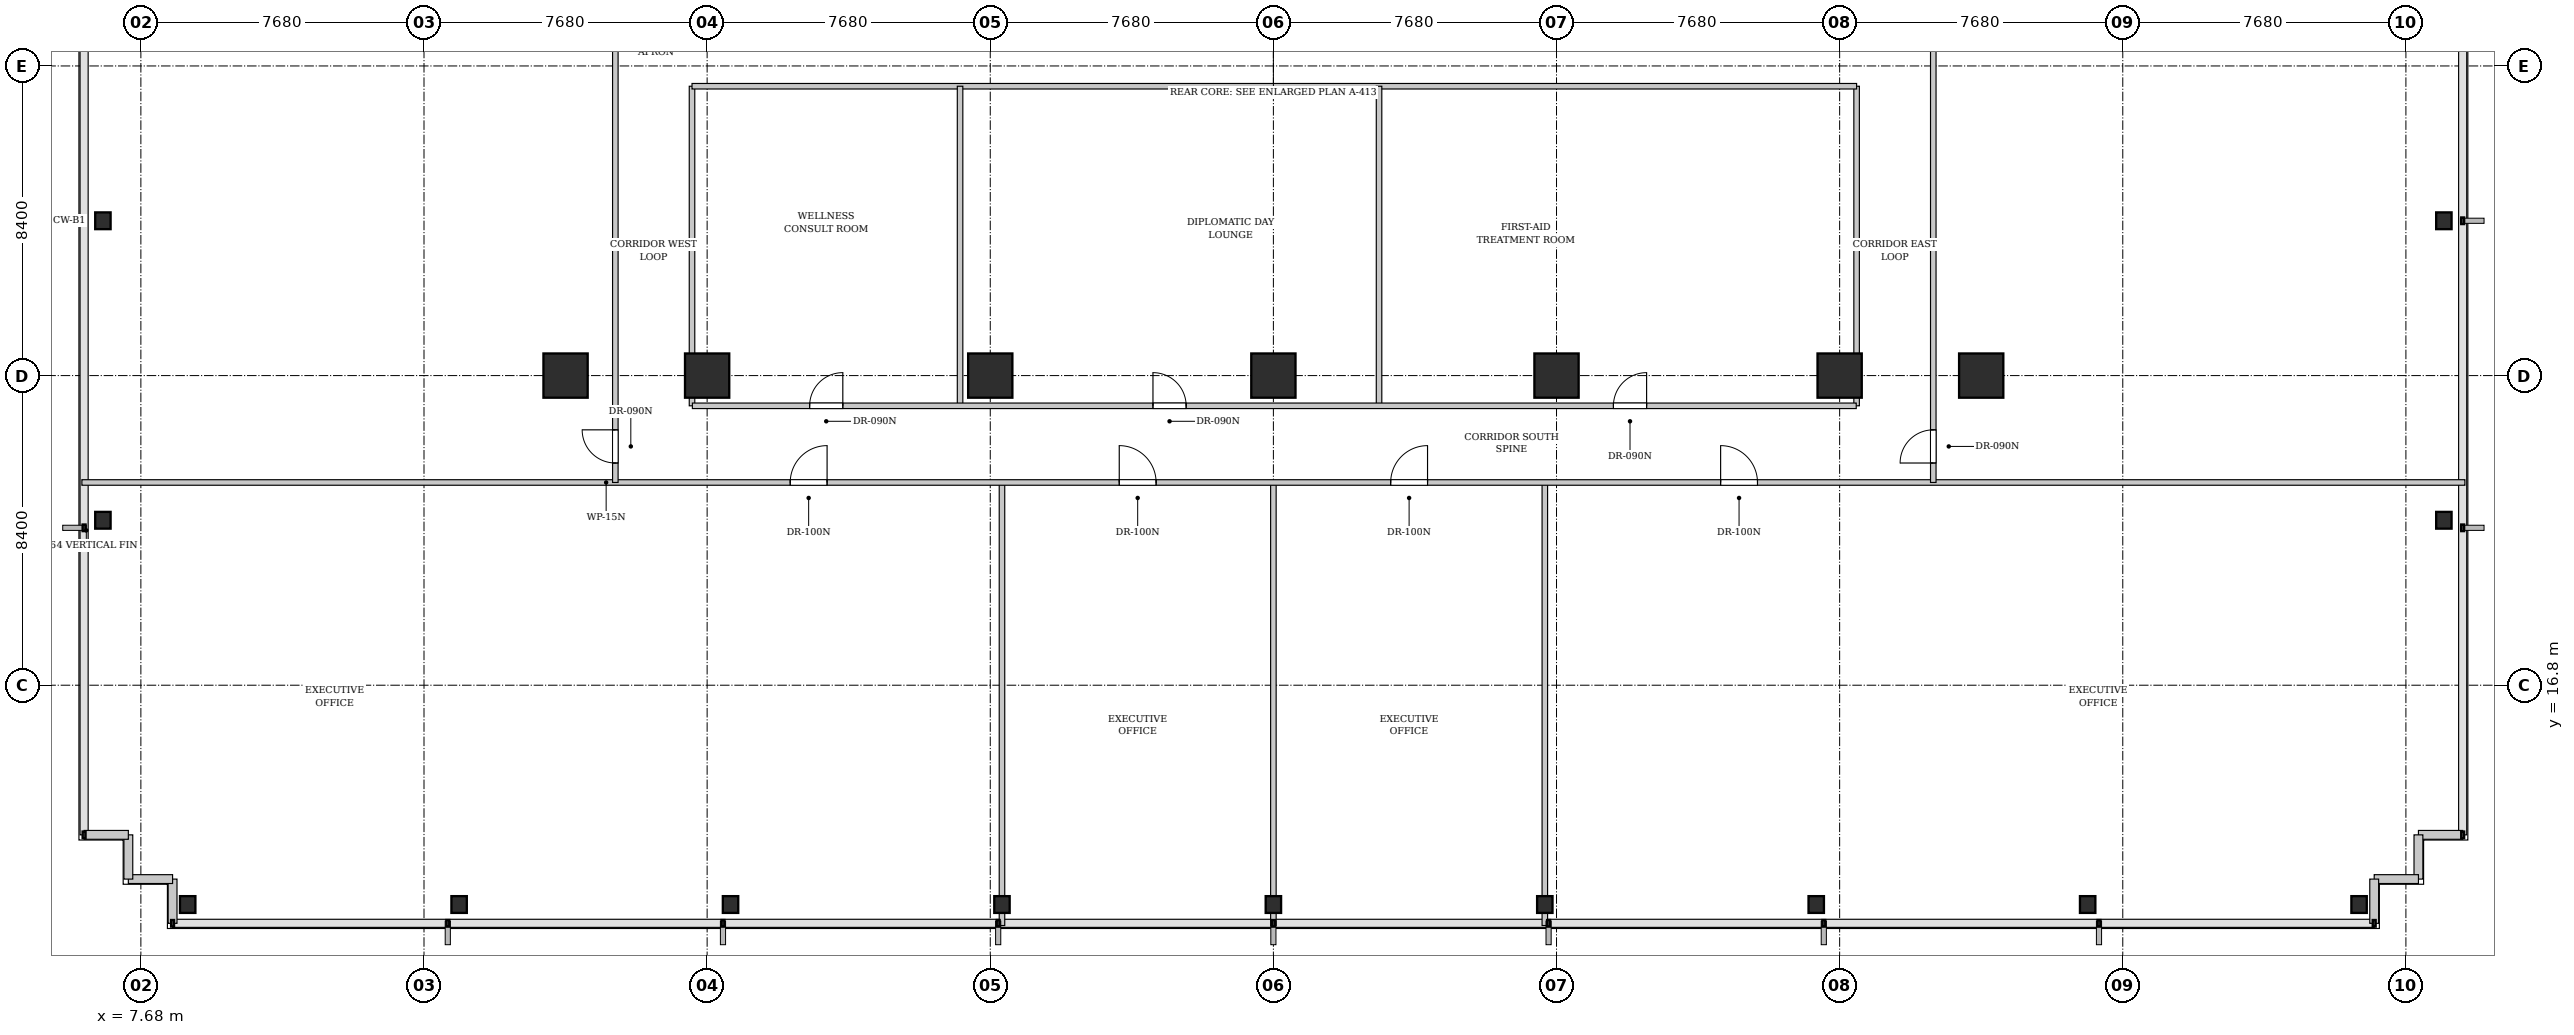
"""IFC4 building model, lengths in metres.
Left out: names, types, materials, properties, quantities, classifications, styles, units other than length and angle.
Written with IfcOpenShell. Run it as: python <this file> out.ifc"""

import sys

from ifc_helpers import new_model, si_unit, direction, frame, frame_2d, origin, origin_2d, place, context, subcontext, project, spatial, rectangle, i_section, extrude, element, fill, save


model = new_model("IFC4")
c1 = context("Model", 3, precision=1e-05, world=origin(), true_north=direction((0.0, 1.0)))
c2 = subcontext(c1, "Body", "Model", "MODEL_VIEW")
j1 = project(units=[si_unit("LENGTHUNIT", "METRE"), si_unit("PLANEANGLEUNIT", "RADIAN")], contexts=[c1])
p1 = place(None, origin())
s1 = spatial("IfcSite", under=j1, at=p1, CompositionType="ELEMENT")
p2 = place(p1, origin())
s2 = spatial("IfcBuilding", under=s1, at=p2, CompositionType="ELEMENT")
p3 = place(p2, frame((0.0, 0.0, 47.4)))
s3 = spatial("IfcBuildingStorey", under=s2, at=p3, CompositionType="ELEMENT", Elevation=47.4)
for number, where, z_axis, x_axis in (
    (1, (23.04, 25.2, 0.0), (0.0, 0.0, 1.0), (1.0, 0.0, 0.0)),
    (2, (30.72, 25.2, 0.0), (0.0, 0.0, 1.0), (1.0, 0.0, 0.0)),
    (3, (38.4, 25.2, 0.0), (0.0, 0.0, 1.0), (1.0, 0.0, 0.0)),
    (4, (46.08, 25.2, 0.0), (0.0, 0.0, 1.0), (1.0, 0.0, 0.0)),
    (5, (53.76, 25.2, 0.0), (0.0, 0.0, 1.0), (1.0, 0.0, 0.0)),
    (6, (19.2, 25.2, 0.0), (0.0, 0.0, 1.0), (1.0, 0.0, 0.0)),
    (7, (57.6, 25.2, 0.0), (0.0, 0.0, 1.0), (1.0, 0.0, 0.0)),
):
    element("IfcColumn", number, at=place(p3, frame(where, z_axis=z_axis, x_axis=x_axis)), inside=s3, PredefinedType="COLUMN", context=c2, shape_type="SweptSolid", body=[
        extrude(rectangle(XDim=1.2, YDim=1.2, at=origin_2d()), origin(), (0.0, 0.0, 1.0), 3.4),
    ])
for number, where, z_axis, x_axis in (
    (8, (8.95, 10.85, 0.0), (0.0, 0.0, 1.0), (1.0, 0.0, 0.0)),
    (9, (16.312, 10.85, 0.0), (0.0, 0.0, 1.0), (1.0, 0.0, 0.0)),
    (10, (23.675, 10.85, 0.0), (0.0, 0.0, 1.0), (1.0, 0.0, 0.0)),
    (11, (31.038, 10.85, 0.0), (0.0, 0.0, 1.0), (1.0, 0.0, 0.0)),
    (12, (38.4, 10.85, 0.0), (0.0, 0.0, 1.0), (1.0, 0.0, 0.0)),
    (13, (45.762, 10.85, 0.0), (0.0, 0.0, 1.0), (1.0, 0.0, 0.0)),
    (14, (53.125, 10.85, 0.0), (0.0, 0.0, 1.0), (1.0, 0.0, 0.0)),
    (15, (60.488, 10.85, 0.0), (0.0, 0.0, 1.0), (1.0, 0.0, 0.0)),
    (16, (67.85, 10.85, 0.0), (0.0, 0.0, 1.0), (1.0, 0.0, 0.0)),
    (17, (6.65, 21.275, 0.0), (0.0, 0.0, 1.0), (1.0, 0.0, 0.0)),
    (18, (70.15, 21.275, 0.0), (0.0, 0.0, 1.0), (1.0, 0.0, 0.0)),
    (19, (6.65, 29.4, 0.0), (0.0, 0.0, 1.0), (1.0, 0.0, 0.0)),
    (20, (70.15, 29.4, 0.0), (0.0, 0.0, 1.0), (1.0, 0.0, 0.0)),
):
    element("IfcColumn", number, at=place(p3, frame(where, z_axis=z_axis, x_axis=x_axis)), inside=s3, PredefinedType="COLUMN", context=c2, shape_type="SweptSolid", body=[
        extrude(i_section(OverallWidth=0.418, OverallDepth=0.455, WebThickness=0.042, FlangeThickness=0.068, FilletRadius=0.015, at=origin_2d()), origin(), (0.0, 0.0, 1.0), 3.4),
    ])
for number, where, z_axis, x_axis in (
    (21, (8.54, 10.34, 0.0), (0.0, 0.0, 1.0), (0.0, 1.0, 0.0)),
    (22, (8.54, 11.54, 0.0), (0.0, 0.0, 1.0), (-1.0, 0.0, 0.0)),
    (23, (7.34, 11.54, 0.0), (0.0, 0.0, 1.0), (0.0, 1.0, 0.0)),
):
    element("IfcWall", number, at=place(p3, frame(where, z_axis=z_axis, x_axis=x_axis)), inside=s3, PredefinedType="SOLIDWALL", context=c2, shape_type="SweptSolid", body=[
        extrude(rectangle(XDim=1.2, YDim=0.24, at=frame_2d((0.6, 0.0))), origin(), (0.0, 0.0, 1.0), 3.18),
    ])
p4 = place(p3, frame((7.34, 12.74, 0.0), z_axis=(0.0, 0.0, 1.0), x_axis=(-1.0, 0.0, 0.0)))
e24 = element("IfcWall", 24, at=p4, inside=s3, PredefinedType="SOLIDWALL", context=c2, shape_type="SweptSolid", body=[
    extrude(rectangle(XDim=1.2, YDim=0.24, at=frame_2d((0.6, 0.0))), origin(), (0.0, 0.0, 1.0), 3.18),
])
for number, where, z_axis, x_axis in (
    (25, (70.66, 12.74, 0.0), (0.0, 0.0, 1.0), (-1.0, 0.0, 0.0)),
    (26, (69.46, 12.74, 0.0), (0.0, 0.0, 1.0), (0.0, -1.0, 0.0)),
    (27, (69.46, 11.54, 0.0), (0.0, 0.0, 1.0), (-1.0, 0.0, 0.0)),
    (28, (68.26, 11.54, 0.0), (0.0, 0.0, 1.0), (0.0, -1.0, 0.0)),
):
    element("IfcWall", number, at=place(p3, frame(where, z_axis=z_axis, x_axis=x_axis)), inside=s3, PredefinedType="SOLIDWALL", context=c2, shape_type="SweptSolid", body=[
        extrude(rectangle(XDim=1.2, YDim=0.24, at=frame_2d((0.6, 0.0))), origin(), (0.0, 0.0, 1.0), 3.18),
    ])
for number, where, z_axis, x_axis in (
    (29, (31.038, 10.28, 0.0), (0.0, 0.0, 1.0), (0.0, 1.0, 0.0)),
    (30, (38.4, 10.28, 0.0), (0.0, 0.0, 1.0), (0.0, 1.0, 0.0)),
    (31, (45.763, 10.28, 0.0), (0.0, 0.0, 1.0), (0.0, 1.0, 0.0)),
):
    element("IfcWall", number, at=place(p3, frame(where, z_axis=z_axis, x_axis=x_axis)), inside=s3, PredefinedType="PARTITIONING", context=c2, shape_type="SweptSolid", body=[
        extrude(rectangle(XDim=12.04, YDim=0.15, at=frame_2d((6.02, 0.0))), origin(), (0.0, 0.0, 1.0), 2.475),
    ])
p5 = place(p3, frame((6.08, 22.3, 0.0), z_axis=(0.0, 0.0, 1.0), x_axis=(1.0, 0.0, 0.0)))
e32 = element("IfcWall", 32, at=p5, inside=s3, PredefinedType="PARTITIONING", context=c2, shape_type="SweptSolid", body=[
    extrude(rectangle(XDim=64.64, YDim=0.15, at=frame_2d((32.32, 0.0))), origin(), (0.0, 0.0, 1.0), 3.18),
])
p6 = place(p5, frame((19.214, 0.0, 0.0)))
e33 = element("IfcOpeningElement", 33, at=p6, cuts=e32, PredefinedType="OPENING", context=c2, shape_type="SweptSolid", body=[
    extrude(rectangle(XDim=1.0, YDim=2.15, at=frame_2d((0.5, 1.075))), frame((0.0, 0.085, 0.0), z_axis=(0.0, -1.0, 0.0), x_axis=(1.0, 0.0, 0.0)), (0.0, 0.0, 1.0), 0.17),
])
p7 = place(p5, frame((28.139, 0.0, 0.0)))
e34 = element("IfcOpeningElement", 34, at=p7, cuts=e32, PredefinedType="OPENING", context=c2, shape_type="SweptSolid", body=[
    extrude(rectangle(XDim=1.0, YDim=2.15, at=frame_2d((0.5, 1.075))), frame((0.0, 0.085, 0.0), z_axis=(0.0, -1.0, 0.0), x_axis=(1.0, 0.0, 0.0)), (0.0, 0.0, 1.0), 0.17),
])
p8 = place(p5, frame((35.501, 0.0, 0.0)))
e35 = element("IfcOpeningElement", 35, at=p8, cuts=e32, PredefinedType="OPENING", context=c2, shape_type="SweptSolid", body=[
    extrude(rectangle(XDim=1.0, YDim=2.15, at=frame_2d((0.5, 1.075))), frame((0.0, 0.085, 0.0), z_axis=(0.0, -1.0, 0.0), x_axis=(1.0, 0.0, 0.0)), (0.0, 0.0, 1.0), 0.17),
])
p9 = place(p5, frame((44.451, 0.0, 0.0)))
e36 = element("IfcOpeningElement", 36, at=p9, cuts=e32, PredefinedType="OPENING", context=c2, shape_type="SweptSolid", body=[
    extrude(rectangle(XDim=1.0, YDim=2.15, at=frame_2d((0.5, 1.075))), frame((0.0, 0.085, 0.0), z_axis=(0.0, -1.0, 0.0), x_axis=(1.0, 0.0, 0.0)), (0.0, 0.0, 1.0), 0.17),
])
p10 = place(p3, frame((20.55, 22.3, 0.0), z_axis=(0.0, 0.0, 1.0), x_axis=(0.0, 1.0, 0.0)))
e37 = element("IfcWall", 37, at=p10, inside=s3, PredefinedType="PARTITIONING", context=c2, shape_type="SweptSolid", body=[
    extrude(rectangle(XDim=26.22, YDim=0.15, at=frame_2d((13.11, 0.0))), origin(), (0.0, 0.0, 1.0), 3.18),
])
p11 = place(p10, frame((0.528, 0.0, 0.0)))
e38 = element("IfcOpeningElement", 38, at=p11, cuts=e37, PredefinedType="OPENING", context=c2, shape_type="SweptSolid", body=[
    extrude(rectangle(XDim=0.9, YDim=2.15, at=frame_2d((0.45, 1.075))), frame((0.0, 0.085, 0.0), z_axis=(0.0, -1.0, 0.0), x_axis=(1.0, 0.0, 0.0)), (0.0, 0.0, 1.0), 0.17),
])
p12 = place(p3, frame((56.3, 22.3, 0.0), z_axis=(0.0, 0.0, 1.0), x_axis=(0.0, 1.0, 0.0)))
e39 = element("IfcWall", 39, at=p12, inside=s3, PredefinedType="PARTITIONING", context=c2, shape_type="SweptSolid", body=[
    extrude(rectangle(XDim=26.22, YDim=0.15, at=frame_2d((13.11, 0.0))), origin(), (0.0, 0.0, 1.0), 3.18),
])
p13 = place(p12, frame((0.528, 0.0, 0.0)))
e40 = element("IfcOpeningElement", 40, at=p13, cuts=e39, PredefinedType="OPENING", context=c2, shape_type="SweptSolid", body=[
    extrude(rectangle(XDim=0.9, YDim=2.15, at=frame_2d((0.45, 1.075))), frame((0.0, 0.085, 0.0), z_axis=(0.0, -1.0, 0.0), x_axis=(1.0, 0.0, 0.0)), (0.0, 0.0, 1.0), 0.17),
])
for number, where, z_axis, x_axis in (
    (41, (22.63, 24.38, 0.0), (0.0, 0.0, 1.0), (0.0, 1.0, 0.0)),
    (42, (54.22, 24.38, 0.0), (0.0, 0.0, 1.0), (0.0, 1.0, 0.0)),
):
    element("IfcWall", number, at=place(p3, frame(where, z_axis=z_axis, x_axis=x_axis)), inside=s3, PredefinedType="PARTITIONING", context=c2, shape_type="SweptSolid", body=[
        extrude(rectangle(XDim=8.67, YDim=0.15, at=frame_2d((4.335, 0.0))), origin(), (0.0, 0.0, 1.0), 3.18),
    ])
p14 = place(p3, frame((22.63, 33.05, 0.0), z_axis=(0.0, 0.0, 1.0), x_axis=(1.0, 0.0, 0.0)))
e43 = element("IfcWall", 43, at=p14, inside=s3, PredefinedType="PARTITIONING", context=c2, shape_type="SweptSolid", body=[
    extrude(rectangle(XDim=31.59, YDim=0.15, at=frame_2d((15.795, 0.0))), origin(), (0.0, 0.0, 1.0), 3.18),
])
for number, where, z_axis, x_axis in (
    (44, (29.901, 24.38, 0.0), (0.0, 0.0, 1.0), (0.0, 1.0, 0.0)),
    (45, (41.266, 24.38, 0.0), (0.0, 0.0, 1.0), (0.0, 1.0, 0.0)),
):
    element("IfcWall", number, at=place(p3, frame(where, z_axis=z_axis, x_axis=x_axis)), inside=s3, PredefinedType="PARTITIONING", context=c2, shape_type="SweptSolid", body=[
        extrude(rectangle(XDim=8.67, YDim=0.15, at=frame_2d((4.335, 0.0))), origin(), (0.0, 0.0, 1.0), 3.18),
    ])
p15 = place(p3, frame((22.64, 24.38, 0.0), z_axis=(0.0, 0.0, 1.0), x_axis=(1.0, 0.0, 0.0)))
e46 = element("IfcWall", 46, at=p15, inside=s3, PredefinedType="PARTITIONING", context=c2, shape_type="SweptSolid", body=[
    extrude(rectangle(XDim=31.57, YDim=0.15, at=frame_2d((15.785, 0.0))), origin(), (0.0, 0.0, 1.0), 3.18),
])
p16 = place(p15, frame((3.18, 0.0, 0.0)))
e47 = element("IfcOpeningElement", 47, at=p16, cuts=e46, PredefinedType="OPENING", context=c2, shape_type="SweptSolid", body=[
    extrude(rectangle(XDim=0.9, YDim=2.15, at=frame_2d((0.45, 1.075))), frame((0.0, 0.085, 0.0), z_axis=(0.0, -1.0, 0.0), x_axis=(1.0, 0.0, 0.0)), (0.0, 0.0, 1.0), 0.17),
])
p17 = place(p15, frame((12.493, 0.0, 0.0)))
e48 = element("IfcOpeningElement", 48, at=p17, cuts=e46, PredefinedType="OPENING", context=c2, shape_type="SweptSolid", body=[
    extrude(rectangle(XDim=0.9, YDim=2.15, at=frame_2d((0.45, 1.075))), frame((0.0, 0.085, 0.0), z_axis=(0.0, -1.0, 0.0), x_axis=(1.0, 0.0, 0.0)), (0.0, 0.0, 1.0), 0.17),
])
p18 = place(p15, frame((24.984, 0.0, 0.0)))
e49 = element("IfcOpeningElement", 49, at=p18, cuts=e46, PredefinedType="OPENING", context=c2, shape_type="SweptSolid", body=[
    extrude(rectangle(XDim=0.9, YDim=2.15, at=frame_2d((0.45, 1.075))), frame((0.0, 0.085, 0.0), z_axis=(0.0, -1.0, 0.0), x_axis=(1.0, 0.0, 0.0)), (0.0, 0.0, 1.0), 0.17),
])
p19 = place(p6, origin())
e50 = element("IfcDoor", 50, at=p19, inside=s3, OperationType="SINGLE_SWING_RIGHT", PredefinedType="DOOR", context=c2, shape_type="SweptSolid", body=[
    extrude(rectangle(XDim=1.0, YDim=2.15, at=frame_2d((0.5, 1.075))), frame((0.0, 0.025, 0.0), z_axis=(0.0, -1.0, 0.0), x_axis=(1.0, 0.0, 0.0)), (0.0, 0.0, 1.0), 0.05),
])
fill(e33, e50)
p20 = place(p7, origin())
e51 = element("IfcDoor", 51, at=p20, inside=s3, OperationType="SINGLE_SWING_LEFT", PredefinedType="DOOR", context=c2, shape_type="SweptSolid", body=[
    extrude(rectangle(XDim=1.0, YDim=2.15, at=frame_2d((0.5, 1.075))), frame((0.0, 0.025, 0.0), z_axis=(0.0, -1.0, 0.0), x_axis=(1.0, 0.0, 0.0)), (0.0, 0.0, 1.0), 0.05),
])
fill(e34, e51)
p21 = place(p8, origin())
e52 = element("IfcDoor", 52, at=p21, inside=s3, OperationType="SINGLE_SWING_RIGHT", PredefinedType="DOOR", context=c2, shape_type="SweptSolid", body=[
    extrude(rectangle(XDim=1.0, YDim=2.15, at=frame_2d((0.5, 1.075))), frame((0.0, 0.025, 0.0), z_axis=(0.0, -1.0, 0.0), x_axis=(1.0, 0.0, 0.0)), (0.0, 0.0, 1.0), 0.05),
])
fill(e35, e52)
p22 = place(p9, origin())
e53 = element("IfcDoor", 53, at=p22, inside=s3, OperationType="SINGLE_SWING_LEFT", PredefinedType="DOOR", context=c2, shape_type="SweptSolid", body=[
    extrude(rectangle(XDim=1.0, YDim=2.15, at=frame_2d((0.5, 1.075))), frame((0.0, 0.025, 0.0), z_axis=(0.0, -1.0, 0.0), x_axis=(1.0, 0.0, 0.0)), (0.0, 0.0, 1.0), 0.05),
])
fill(e36, e53)
p23 = place(p11, origin())
e54 = element("IfcDoor", 54, at=p23, inside=s3, OperationType="SINGLE_SWING_RIGHT", PredefinedType="DOOR", context=c2, shape_type="SweptSolid", body=[
    extrude(rectangle(XDim=0.9, YDim=2.15, at=frame_2d((0.45, 1.075))), frame((0.0, 0.025, 0.0), z_axis=(0.0, -1.0, 0.0), x_axis=(1.0, 0.0, 0.0)), (0.0, 0.0, 1.0), 0.05),
])
fill(e38, e54)
p24 = place(p13, origin())
e55 = element("IfcDoor", 55, at=p24, inside=s3, OperationType="SINGLE_SWING_LEFT", PredefinedType="DOOR", context=c2, shape_type="SweptSolid", body=[
    extrude(rectangle(XDim=0.9, YDim=2.15, at=frame_2d((0.45, 1.075))), frame((0.0, 0.025, 0.0), z_axis=(0.0, -1.0, 0.0), x_axis=(1.0, 0.0, 0.0)), (0.0, 0.0, 1.0), 0.05),
])
fill(e40, e55)
p25 = place(p16, origin())
e56 = element("IfcDoor", 56, at=p25, inside=s3, OperationType="SINGLE_SWING_RIGHT", PredefinedType="DOOR", context=c2, shape_type="SweptSolid", body=[
    extrude(rectangle(XDim=0.9, YDim=2.15, at=frame_2d((0.45, 1.075))), frame((0.0, 0.025, 0.0), z_axis=(0.0, -1.0, 0.0), x_axis=(1.0, 0.0, 0.0)), (0.0, 0.0, 1.0), 0.05),
])
fill(e47, e56)
p26 = place(p17, origin())
e57 = element("IfcDoor", 57, at=p26, inside=s3, OperationType="SINGLE_SWING_LEFT", PredefinedType="DOOR", context=c2, shape_type="SweptSolid", body=[
    extrude(rectangle(XDim=0.9, YDim=2.15, at=frame_2d((0.45, 1.075))), frame((0.0, 0.025, 0.0), z_axis=(0.0, -1.0, 0.0), x_axis=(1.0, 0.0, 0.0)), (0.0, 0.0, 1.0), 0.05),
])
fill(e48, e57)
p27 = place(p18, origin())
e58 = element("IfcDoor", 58, at=p27, inside=s3, OperationType="SINGLE_SWING_RIGHT", PredefinedType="DOOR", context=c2, shape_type="SweptSolid", body=[
    extrude(rectangle(XDim=0.9, YDim=2.15, at=frame_2d((0.45, 1.075))), frame((0.0, 0.025, 0.0), z_axis=(0.0, -1.0, 0.0), x_axis=(1.0, 0.0, 0.0)), (0.0, 0.0, 1.0), 0.05),
])
fill(e49, e58)
save(model, sys.argv[1])
